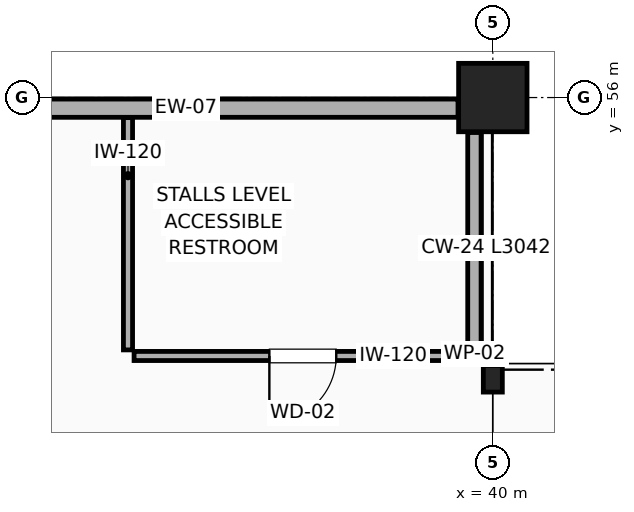
"""IFC4 building model, lengths in metres.
Left out: names, types, materials, properties, quantities, classifications, styles, units other than length and angle.
Written with IfcOpenShell. Run it as: python <this file> out.ifc"""

import sys

from ifc_helpers import new_model, si_unit, direction, frame, frame_2d, origin, origin_2d, place, context, subcontext, project, spatial, rectangle, i_section, extrude, element, fill, save


model = new_model("IFC4")
c1 = context("Model", 3, precision=1e-05, world=origin(), true_north=direction((0.0, 1.0)))
c2 = subcontext(c1, "Body", "Model", "MODEL_VIEW")
j1 = project(units=[si_unit("LENGTHUNIT", "METRE"), si_unit("PLANEANGLEUNIT", "RADIAN")], contexts=[c1])
p1 = place(None, origin())
s1 = spatial("IfcSite", under=j1, at=p1, CompositionType="ELEMENT")
p2 = place(p1, origin())
s2 = spatial("IfcBuilding", under=s1, at=p2, CompositionType="ELEMENT")
p3 = place(p2, frame((0.0, 0.0, 5.4)))
s3 = spatial("IfcBuildingStorey", under=s2, at=p3, CompositionType="ELEMENT", Elevation=5.4)
p4 = place(p3, frame((40.0, 56.0, 0.0), z_axis=(0.0, 0.0, 1.0), x_axis=(1.0, 0.0, 0.0)))
e1 = element("IfcColumn", 1, at=p4, inside=s3, PredefinedType="COLUMN", context=c2, shape_type="SweptSolid", body=[
    extrude(rectangle(XDim=0.9, YDim=0.9, at=origin_2d()), origin(), (0.0, 0.0, 1.0), 4.8),
])
p5 = place(p3, frame((40.0, 52.3, 0.0), z_axis=(0.0, 0.0, 1.0), x_axis=(1.0, 0.0, 0.0)))
e2 = element("IfcColumn", 2, at=p5, inside=s3, PredefinedType="COLUMN", context=c2, shape_type="SweptSolid", body=[
    extrude(i_section(OverallWidth=0.25, OverallDepth=0.35, WebThickness=0.01, FlangeThickness=0.012, FilletRadius=0.012, at=origin_2d()), origin(), (0.0, 0.0, 1.0), 4.8),
])
p6 = place(p3, frame((32.383, 55.86, 0.0), z_axis=(0.0, 0.0, 1.0), x_axis=(1.0, 0.0, 0.0)))
e3 = element("IfcWall", 3, at=p6, inside=s3, PredefinedType="ELEMENTEDWALL", context=c2, shape_type="SweptSolid", body=[
    extrude(rectangle(XDim=7.159, YDim=0.24, at=frame_2d((3.58, 0.0))), origin(), (0.0, 0.0, 1.0), 3.675),
])
p7 = place(p3, frame((39.76, 55.54, 0.0), z_axis=(0.0, 0.0, 1.0), x_axis=(0.0, -1.0, 0.0)))
e4 = element("IfcWall", 4, at=p7, inside=s3, PredefinedType="PARAPET", context=c2, shape_type="SweptSolid", body=[
    extrude(rectangle(XDim=2.92, YDim=0.18, at=frame_2d((1.46, 0.0))), origin(), (0.0, 0.0, 1.0), 0.88),
])
p8 = place(p3, frame((39.826, 52.6, 0.0), z_axis=(0.0, 0.0, 1.0), x_axis=(-1.0, 0.0, 0.0)))
e5 = element("IfcWall", 5, at=p8, inside=s3, PredefinedType="PARTITIONING", context=c2, shape_type="SweptSolid", body=[
    extrude(rectangle(XDim=4.546, YDim=0.12, at=frame_2d((2.273, 0.0))), origin(), (0.0, 0.0, 1.0), 4.53),
])
p9 = place(p8, frame((1.886, 0.0, 0.0)))
e6 = element("IfcOpeningElement", 6, at=p9, cuts=e5, PredefinedType="OPENING", context=c2, shape_type="SweptSolid", body=[
    extrude(rectangle(XDim=0.88, YDim=2.1, at=frame_2d((0.44, 1.05))), frame((0.0, 0.07, 0.0), z_axis=(0.0, -1.0, 0.0), x_axis=(1.0, 0.0, 0.0)), (0.0, 0.0, 1.0), 0.14),
])
p10 = place(p3, frame((35.2, 52.68, 0.0), z_axis=(0.0, 0.0, 1.0), x_axis=(0.0, 1.0, 0.0)))
e7 = element("IfcWall", 7, at=p10, inside=s3, PredefinedType="PARTITIONING", context=c2, shape_type="SweptSolid", body=[
    extrude(rectangle(XDim=3.056, YDim=0.12, at=frame_2d((1.528, 0.0))), origin(), (0.0, 0.0, 1.0), 4.53),
])
p11 = place(p9, origin())
e8 = element("IfcDoor", 8, at=p11, inside=s3, OperationType="SINGLE_SWING_RIGHT", PredefinedType="DOOR", context=c2, shape_type="SweptSolid", body=[
    extrude(rectangle(XDim=0.88, YDim=2.1, at=frame_2d((0.44, 1.05))), frame((0.0, 0.025, 0.0), z_axis=(0.0, -1.0, 0.0), x_axis=(1.0, 0.0, 0.0)), (0.0, 0.0, 1.0), 0.05),
])
fill(e6, e8)
save(model, sys.argv[1])
